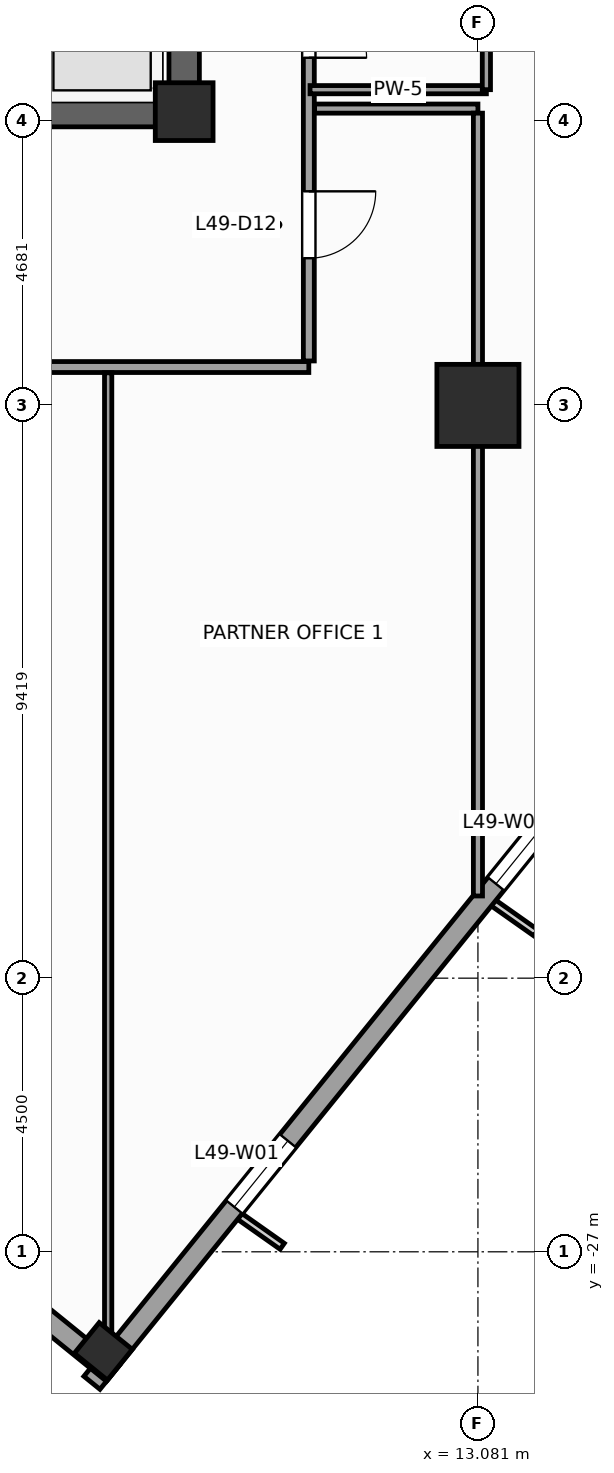
"""IFC4 building model, lengths in metres.
Left out: names, types, materials, properties, quantities, classifications, styles, units other than length and angle.
Written with IfcOpenShell. Run it as: python <this file> out.ifc"""

import sys

from ifc_helpers import new_model, si_unit, direction, frame, frame_2d, origin, origin_2d, place, context, subcontext, project, spatial, rectangle, extrude, source, transform, mapped, element, fill, save


model = new_model("IFC4")
c1 = context("Model", 3, precision=1e-05, world=origin(), true_north=direction((0.0, 1.0)))
c2 = subcontext(c1, "Body", "Model", "MODEL_VIEW")
j1 = project(units=[si_unit("LENGTHUNIT", "METRE"), si_unit("PLANEANGLEUNIT", "RADIAN")], contexts=[c1])
p1 = place(None, origin())
s1 = spatial("IfcSite", under=j1, at=p1, CompositionType="ELEMENT")
p2 = place(p1, origin())
s2 = spatial("IfcBuilding", under=s1, at=p2, CompositionType="ELEMENT")
p3 = place(p2, frame((0.0, 0.0, 205.6)))
s3 = spatial("IfcBuildingStorey", under=s2, at=p3, CompositionType="ELEMENT", Elevation=205.6)
p4 = place(p3, frame((-8.5, -8.25, 0.0), z_axis=(0.0, 0.0, 1.0), x_axis=(1.0, 0.0, 0.0)))
e1 = element("IfcWall", 1, at=p4, inside=s3, PredefinedType="SHEAR", context=c2, shape_type="SweptSolid", body=[
    extrude(rectangle(XDim=17.0, YDim=0.5, at=frame_2d((8.5, 0.0))), origin(), (0.0, 0.0, 1.0), 3.9),
])
p5 = place(p4, frame((7.85, 0.0, 0.0)))
e2 = element("IfcOpeningElement", 2, at=p5, cuts=e1, PredefinedType="OPENING", context=c2, shape_type="SweptSolid", body=[
    extrude(rectangle(XDim=1.3, YDim=2.2, at=frame_2d((0.65, 1.1))), frame((0.0, 0.26, 0.0), z_axis=(0.0, -1.0, 0.0), x_axis=(1.0, 0.0, 0.0)), (0.0, 0.0, 1.0), 0.52),
])
p6 = place(p3, frame((8.25, -8.0, 0.0), z_axis=(0.0, 0.0, 1.0), x_axis=(0.0, 1.0, 0.0)))
e3 = element("IfcWall", 3, at=p6, inside=s3, PredefinedType="SHEAR", context=c2, shape_type="SweptSolid", body=[
    extrude(rectangle(XDim=16.0, YDim=0.5, at=frame_2d((8.0, 0.0))), origin(), (0.0, 0.0, 1.0), 3.9),
])
p7 = place(p6, frame((4.69, 0.0, 0.0)))
e4 = element("IfcOpeningElement", 4, at=p7, cuts=e3, PredefinedType="OPENING", context=c2, shape_type="SweptSolid", body=[
    extrude(rectangle(XDim=1.3, YDim=2.2, at=frame_2d((0.65, 1.1))), frame((0.0, 0.26, 0.0), z_axis=(0.0, -1.0, 0.0), x_axis=(1.0, 0.0, 0.0)), (0.0, 0.0, 1.0), 0.52),
])
m1 = source(origin(), c2, "Body", "SweptSolid", [
    extrude(rectangle(XDim=0.95, YDim=0.95, at=origin_2d()), origin(), (0.0, 0.0, 1.0), 3.9),
])
p8 = place(p3, frame((8.25, -8.25, 0.0), z_axis=(0.0, 0.0, 1.0), x_axis=(1.0, 0.0, 0.0)))
e5 = element("IfcColumn", 5, at=p8, inside=s3, PredefinedType="PILASTER", context=c2, shape_type="MappedRepresentation", body=[
    mapped(m1, transform((0.0, 0.0, 0.0), scale=1.0)),
])
m2 = source(origin(), c2, "Body", "SweptSolid", [
    extrude(rectangle(XDim=1.35, YDim=1.35, at=origin_2d()), origin(), (0.0, 0.0, 1.0), 3.9),
])
p9 = place(p3, frame((13.081, -13.081, 0.0), z_axis=(0.0, 0.0, 1.0), x_axis=(1.0, 0.0, 0.0)))
e6 = element("IfcColumn", 6, at=p9, inside=s3, PredefinedType="COLUMN", context=c2, shape_type="MappedRepresentation", body=[
    mapped(m2, transform((0.0, 0.0, 0.0), scale=1.0)),
])
m3 = source(origin(), c2, "Body", "SweptSolid", [
    extrude(rectangle(XDim=0.65, YDim=0.7, at=origin_2d()), origin(), (0.0, 0.0, 1.0), 3.9),
])
p10 = place(p3, frame((6.92, -28.637, 0.0), z_axis=(0.0, 0.0, 1.0), x_axis=(0.62932039105, 0.777145961457, 0.0)))
e7 = element("IfcColumn", 7, at=p10, inside=s3, PredefinedType="COLUMN", context=c2, shape_type="MappedRepresentation", body=[
    mapped(m3, transform((0.0, 0.0, 0.0), scale=1.0)),
])
p11 = place(p3, frame((6.733, -29.154, 0.0), z_axis=(0.0, 0.0, 1.0), x_axis=(0.629325378072, 0.77714192302, 0.0)))
e8 = element("IfcWall", 8, at=p11, inside=s3, PredefinedType="STANDARD", context=c2, shape_type="SweptSolid", body=[
    extrude(rectangle(XDim=36.84, YDim=0.34, at=frame_2d((18.42, 0.0))), origin(), (0.0, 0.0, 1.0), 2.96),
])
p12 = place(p11, frame((3.721, 0.0, 0.48)))
e9 = element("IfcOpeningElement", 9, at=p12, cuts=e8, PredefinedType="OPENING", context=c2, shape_type="SweptSolid", body=[
    extrude(rectangle(XDim=1.4, YDim=2.4, at=frame_2d((0.7, 1.2))), frame((0.0, 0.18, 0.0), z_axis=(0.0, -1.0, 0.0), x_axis=(1.0, 0.0, 0.0)), (0.0, 0.0, 1.0), 0.36),
])
p13 = place(p11, frame((10.559, 0.0, 0.58)))
e10 = element("IfcOpeningElement", 10, at=p13, cuts=e8, PredefinedType="OPENING", context=c2, shape_type="SweptSolid", body=[
    extrude(rectangle(XDim=1.75, YDim=2.3, at=frame_2d((0.875, 1.15))), frame((0.0, 0.18, 0.0), z_axis=(0.0, -1.0, 0.0), x_axis=(1.0, 0.0, 0.0)), (0.0, 0.0, 1.0), 0.36),
])
p14 = place(p11, frame((16.058, 0.0, 0.58)))
e11 = element("IfcOpeningElement", 11, at=p14, cuts=e8, PredefinedType="OPENING", context=c2, shape_type="SweptSolid", body=[
    extrude(rectangle(XDim=1.75, YDim=2.3, at=frame_2d((0.875, 1.15))), frame((0.0, 0.18, 0.0), z_axis=(0.0, -1.0, 0.0), x_axis=(1.0, 0.0, 0.0)), (0.0, 0.0, 1.0), 0.36),
])
p15 = place(p11, frame((24.176, 0.0, 0.58)))
e12 = element("IfcOpeningElement", 12, at=p15, cuts=e8, PredefinedType="OPENING", context=c2, shape_type="SweptSolid", body=[
    extrude(rectangle(XDim=1.75, YDim=2.3, at=frame_2d((0.875, 1.15))), frame((0.0, 0.18, 0.0), z_axis=(0.0, -1.0, 0.0), x_axis=(1.0, 0.0, 0.0)), (0.0, 0.0, 1.0), 0.36),
])
p16 = place(p11, frame((30.982, 0.0, 0.48)))
e13 = element("IfcOpeningElement", 13, at=p16, cuts=e8, PredefinedType="OPENING", context=c2, shape_type="SweptSolid", body=[
    extrude(rectangle(XDim=1.4, YDim=2.4, at=frame_2d((0.7, 1.2))), frame((0.0, 0.18, 0.0), z_axis=(0.0, -1.0, 0.0), x_axis=(1.0, 0.0, 0.0)), (0.0, 0.0, 1.0), 0.36),
])
p17 = place(p3, frame((2.673, -25.429, 0.0), z_axis=(0.0, 0.0, 1.0), x_axis=(0.777162640055, -0.629299794138, 0.0)))
e14 = element("IfcWall", 14, at=p17, inside=s3, PredefinedType="STANDARD", context=c2, shape_type="SweptSolid", body=[
    extrude(rectangle(XDim=5.67, YDim=0.34, at=frame_2d((2.835, 0.0))), origin(), (0.0, 0.0, 1.0), 3.66),
])
p18 = place(p17, frame((2.135, 0.0, 0.48)))
e15 = element("IfcOpeningElement", 15, at=p18, cuts=e14, PredefinedType="OPENING", context=c2, shape_type="SweptSolid", body=[
    extrude(rectangle(XDim=1.4, YDim=2.4, at=frame_2d((0.7, 1.2))), frame((0.0, 0.18, 0.0), z_axis=(0.0, -1.0, 0.0), x_axis=(1.0, 0.0, 0.0)), (0.0, 0.0, 1.0), 0.36),
])
p19 = place(p3, frame((-11.45, -12.45, 0.0), z_axis=(0.0, 0.0, 1.0), x_axis=(1.0, 0.0, 0.0)))
e16 = element("IfcWall", 16, at=p19, inside=s3, PredefinedType="PARTITIONING", context=c2, shape_type="SweptSolid", body=[
    extrude(rectangle(XDim=21.75, YDim=0.18, at=frame_2d((10.875, 0.0))), origin(), (0.0, 0.0, 1.0), 3.66),
])
p20 = place(p19, frame((5.411, 0.0, 0.0)))
e17 = element("IfcOpeningElement", 17, at=p20, cuts=e16, PredefinedType="OPENING", context=c2, shape_type="SweptSolid", body=[
    extrude(rectangle(XDim=0.95, YDim=2.1, at=frame_2d((0.475, 1.05))), frame((0.0, 0.1, 0.0), z_axis=(0.0, -1.0, 0.0), x_axis=(1.0, 0.0, 0.0)), (0.0, 0.0, 1.0), 0.2),
])
p21 = place(p19, frame((1.839, 0.0, 0.0)))
e18 = element("IfcOpeningElement", 18, at=p21, cuts=e16, PredefinedType="OPENING", context=c2, shape_type="SweptSolid", body=[
    extrude(rectangle(XDim=1.1, YDim=2.2, at=frame_2d((0.55, 1.1))), frame((0.0, 0.1, 0.0), z_axis=(0.0, -1.0, 0.0), x_axis=(1.0, 0.0, 0.0)), (0.0, 0.0, 1.0), 0.2),
])
p22 = place(p19, frame((7.574, 0.0, 0.0)))
e19 = element("IfcOpeningElement", 19, at=p22, cuts=e16, PredefinedType="OPENING", context=c2, shape_type="SweptSolid", body=[
    extrude(rectangle(XDim=1.1, YDim=2.2, at=frame_2d((0.55, 1.1))), frame((0.0, 0.1, 0.0), z_axis=(0.0, -1.0, 0.0), x_axis=(1.0, 0.0, 0.0)), (0.0, 0.0, 1.0), 0.2),
])
p23 = place(p19, frame((11.05, 0.0, 0.0)))
e20 = element("IfcOpeningElement", 20, at=p23, cuts=e16, PredefinedType="OPENING", context=c2, shape_type="SweptSolid", body=[
    extrude(rectangle(XDim=1.1, YDim=2.2, at=frame_2d((0.55, 1.1))), frame((0.0, 0.1, 0.0), z_axis=(0.0, -1.0, 0.0), x_axis=(1.0, 0.0, 0.0)), (0.0, 0.0, 1.0), 0.2),
])
p24 = place(p19, frame((15.65, 0.0, 0.0)))
e21 = element("IfcOpeningElement", 21, at=p24, cuts=e16, PredefinedType="OPENING", context=c2, shape_type="SweptSolid", body=[
    extrude(rectangle(XDim=1.1, YDim=2.2, at=frame_2d((0.55, 1.1))), frame((0.0, 0.1, 0.0), z_axis=(0.0, -1.0, 0.0), x_axis=(1.0, 0.0, 0.0)), (0.0, 0.0, 1.0), 0.2),
])
p25 = place(p3, frame((10.3, -12.35, 0.0), z_axis=(0.0, 0.0, 1.0), x_axis=(0.0, 1.0, 0.0)))
e22 = element("IfcWall", 22, at=p25, inside=s3, PredefinedType="PARTITIONING", context=c2, shape_type="SweptSolid", body=[
    extrude(rectangle(XDim=16.15, YDim=0.18, at=frame_2d((8.075, 0.0))), origin(), (0.0, 0.0, 1.0), 3.66),
])
p26 = place(p25, frame((4.986, 0.0, 0.0)))
e23 = element("IfcOpeningElement", 23, at=p26, cuts=e22, PredefinedType="OPENING", context=c2, shape_type="SweptSolid", body=[
    extrude(rectangle(XDim=0.95, YDim=2.1, at=frame_2d((0.475, 1.05))), frame((0.0, 0.1, 0.0), z_axis=(0.0, -1.0, 0.0), x_axis=(1.0, 0.0, 0.0)), (0.0, 0.0, 1.0), 0.2),
])
p27 = place(p25, frame((14.111, 0.0, 0.0)))
e24 = element("IfcOpeningElement", 24, at=p27, cuts=e22, PredefinedType="OPENING", context=c2, shape_type="SweptSolid", body=[
    extrude(rectangle(XDim=1.1, YDim=2.2, at=frame_2d((0.55, 1.1))), frame((0.0, 0.1, 0.0), z_axis=(0.0, -1.0, 0.0), x_axis=(1.0, 0.0, 0.0)), (0.0, 0.0, 1.0), 0.2),
])
p28 = place(p25, frame((1.689, 0.0, 0.0)))
e25 = element("IfcOpeningElement", 25, at=p28, cuts=e22, PredefinedType="OPENING", context=c2, shape_type="SweptSolid", body=[
    extrude(rectangle(XDim=1.1, YDim=2.2, at=frame_2d((0.55, 1.1))), frame((0.0, 0.1, 0.0), z_axis=(0.0, -1.0, 0.0), x_axis=(1.0, 0.0, 0.0)), (0.0, 0.0, 1.0), 0.2),
])
p29 = place(p25, frame((7.65, 0.0, 0.0)))
e26 = element("IfcOpeningElement", 26, at=p29, cuts=e22, PredefinedType="OPENING", context=c2, shape_type="SweptSolid", body=[
    extrude(rectangle(XDim=1.1, YDim=2.2, at=frame_2d((0.55, 1.1))), frame((0.0, 0.1, 0.0), z_axis=(0.0, -1.0, 0.0), x_axis=(1.0, 0.0, 0.0)), (0.0, 0.0, 1.0), 0.2),
])
p30 = place(p25, frame((11.175, 0.0, 0.0)))
e27 = element("IfcOpeningElement", 27, at=p30, cuts=e22, PredefinedType="OPENING", context=c2, shape_type="SweptSolid", body=[
    extrude(rectangle(XDim=1.1, YDim=2.2, at=frame_2d((0.55, 1.1))), frame((0.0, 0.1, 0.0), z_axis=(0.0, -1.0, 0.0), x_axis=(1.0, 0.0, 0.0)), (0.0, 0.0, 1.0), 0.2),
])
p31 = place(p3, frame((7.0, -28.658, 0.0), z_axis=(0.0, 0.0, 1.0), x_axis=(0.0, 1.0, 0.0)))
e28 = element("IfcWall", 28, at=p31, inside=s3, PredefinedType="PARTITIONING", context=c2, shape_type="SweptSolid", body=[
    extrude(rectangle(XDim=16.113, YDim=0.12, at=frame_2d((8.057, 0.0))), origin(), (0.0, 0.0, 1.0), 2.96),
])
p32 = place(p3, frame((10.395, -8.2, 0.0), z_axis=(0.0, 0.0, 1.0), x_axis=(1.0, 0.0, 0.0)))
e29 = element("IfcWall", 29, at=p32, inside=s3, PredefinedType="PARTITIONING", context=c2, shape_type="SweptSolid", body=[
    extrude(rectangle(XDim=2.686, YDim=0.15, at=frame_2d((1.343, 0.0))), origin(), (0.0, 0.0, 1.0), 3.66),
])
p33 = place(p3, frame((13.081, -8.275, 0.0), z_axis=(0.0, 0.0, 1.0), x_axis=(0.0, -1.0, 0.0)))
e30 = element("IfcWall", 30, at=p33, inside=s3, PredefinedType="PARTITIONING", context=c2, shape_type="SweptSolid", body=[
    extrude(rectangle(XDim=12.874, YDim=0.15, at=frame_2d((6.437, 0.0))), origin(), (0.0, 0.0, 1.0), 2.76),
])
p34 = place(p3, frame((10.32, -7.889, 0.0), z_axis=(0.0, 0.0, 1.0), x_axis=(1.0, 0.0, 0.0)))
e31 = element("IfcWall", 31, at=p34, inside=s3, PredefinedType="PARTITIONING", context=c2, shape_type="SweptSolid", body=[
    extrude(rectangle(XDim=2.9, YDim=0.135, at=frame_2d((1.45, 0.0))), origin(), (0.0, 0.0, 1.0), 3.66),
])
p35 = place(p3, frame((13.22, -7.889, 0.0), z_axis=(0.0, 0.0, 1.0), x_axis=(0.0, 1.0, 0.0)))
e32 = element("IfcWall", 32, at=p35, inside=s3, PredefinedType="PARTITIONING", context=c2, shape_type="SweptSolid", body=[
    extrude(rectangle(XDim=2.0, YDim=0.135, at=frame_2d((1.0, 0.0))), origin(), (0.0, 0.0, 1.0), 2.76),
])
m4 = source(origin(), c2, "Body", "SweptSolid", [
    extrude(rectangle(XDim=1.4, YDim=2.4, at=frame_2d((0.7, 1.2))), frame((0.0, 0.03, 0.0), z_axis=(0.0, -1.0, 0.0), x_axis=(1.0, 0.0, 0.0)), (0.0, 0.0, 1.0), 0.06),
])
p36 = place(p12, origin())
e33 = element("IfcWindow", 33, at=p36, inside=s3, PartitioningType="SINGLE_PANEL", PredefinedType="WINDOW", context=c2, shape_type="MappedRepresentation", body=[
    mapped(m4, transform((0.0, 0.0, 0.0), scale=1.0)),
])
fill(e9, e33)
m5 = source(origin(), c2, "Body", "SweptSolid", [
    extrude(rectangle(XDim=1.75, YDim=2.3, at=frame_2d((0.875, 1.15))), frame((0.0, 0.03, 0.0), z_axis=(0.0, -1.0, 0.0), x_axis=(1.0, 0.0, 0.0)), (0.0, 0.0, 1.0), 0.06),
])
p37 = place(p13, origin())
e34 = element("IfcWindow", 34, at=p37, inside=s3, PartitioningType="SINGLE_PANEL", PredefinedType="WINDOW", context=c2, shape_type="MappedRepresentation", body=[
    mapped(m5, transform((0.0, 0.0, 0.0), scale=1.0)),
])
fill(e10, e34)
m6 = source(origin(), c2, "Body", "SweptSolid", [
    extrude(rectangle(XDim=0.95, YDim=2.1, at=frame_2d((0.475, 1.05))), frame((0.0, 0.025, 0.0), z_axis=(0.0, -1.0, 0.0), x_axis=(1.0, 0.0, 0.0)), (0.0, 0.0, 1.0), 0.05),
])
p38 = place(p26, frame((0.95, 0.0, 0.0), z_axis=(0.0, 0.0, 1.0), x_axis=(-1.0, 0.0, 0.0)))
e35 = element("IfcDoor", 35, at=p38, inside=s3, OperationType="SINGLE_SWING_LEFT", PredefinedType="DOOR", context=c2, shape_type="MappedRepresentation", body=[
    mapped(m6, transform((0.0, 0.0, 0.0), scale=1.0)),
])
fill(e23, e35)
m7 = source(origin(), c2, "Body", "SweptSolid", [
    extrude(rectangle(XDim=1.1, YDim=2.2, at=frame_2d((0.55, 1.1))), frame((0.0, 0.025, 0.0), z_axis=(0.0, -1.0, 0.0), x_axis=(1.0, 0.0, 0.0)), (0.0, 0.0, 1.0), 0.05),
])
p39 = place(p28, frame((1.1, 0.0, 0.0), z_axis=(0.0, 0.0, 1.0), x_axis=(-1.0, 0.0, 0.0)))
e36 = element("IfcDoor", 36, at=p39, inside=s3, OperationType="SINGLE_SWING_RIGHT", PredefinedType="DOOR", context=c2, shape_type="MappedRepresentation", body=[
    mapped(m7, transform((0.0, 0.0, 0.0), scale=1.0)),
])
fill(e25, e36)
save(model, sys.argv[1])
